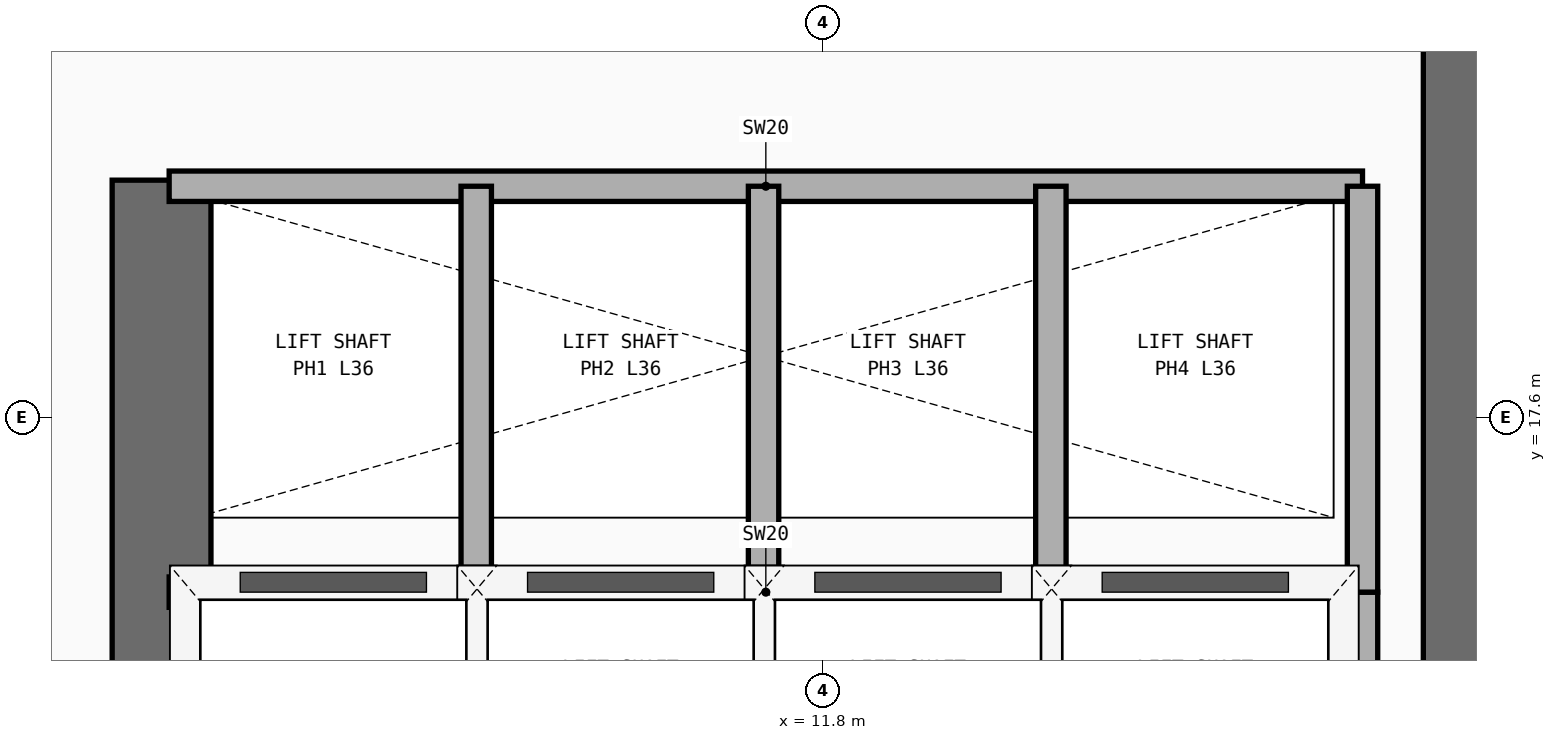
"""IFC4 building model, lengths in metres.
Left out: names, types, materials, properties, quantities, classifications, styles, units other than length and angle.
Written with IfcOpenShell. Run it as: python <this file> out.ifc"""

import sys

from ifc_helpers import new_model, si_unit, direction, frame, frame_2d, origin, place, context, subcontext, project, spatial, rectangle, extrude, element, save


model = new_model("IFC4")
c1 = context("Model", 3, precision=1e-05, world=origin(), true_north=direction((0.0, 1.0)))
c2 = subcontext(c1, "Body", "Model", "MODEL_VIEW")
j1 = project(units=[si_unit("LENGTHUNIT", "METRE"), si_unit("PLANEANGLEUNIT", "RADIAN")], contexts=[c1])
p1 = place(None, origin())
s1 = spatial("IfcSite", under=j1, at=p1, CompositionType="ELEMENT")
p2 = place(p1, origin())
s2 = spatial("IfcBuilding", under=s1, at=p2, CompositionType="ELEMENT")
p3 = place(p2, frame((0.0, 0.0, 141.1)))
s3 = spatial("IfcBuildingStorey", under=s2, at=p3, CompositionType="ELEMENT", Elevation=141.1)
p4 = place(p3, frame((7.45, 14.35, 0.0), z_axis=(0.0, 0.0, 1.0), x_axis=(0.0, 1.0, 0.0)))
e1 = element("IfcWall", 1, at=p4, inside=s3, PredefinedType="SHEAR", context=c2, shape_type="SweptSolid", body=[
    extrude(rectangle(XDim=4.81, YDim=0.65, at=frame_2d((2.405, 0.0))), origin(), (0.0, 0.0, 1.0), 4.86),
])
p5 = place(p3, frame((16.075, 14.4, 0.0), z_axis=(0.0, 0.0, 1.0), x_axis=(0.0, 1.0, 0.0)))
e2 = element("IfcWall", 2, at=p5, inside=s3, PredefinedType="SHEAR", context=c2, shape_type="SweptSolid", body=[
    extrude(rectangle(XDim=9.1, YDim=0.65, at=frame_2d((4.55, 0.0))), origin(), (0.0, 0.0, 1.0), 4.86),
])
p6 = place(p3, frame((7.5, 16.45, 0.0), z_axis=(0.0, 0.0, 1.0), x_axis=(1.0, 0.0, 0.0)))
e3 = element("IfcWall", 3, at=p6, inside=s3, PredefinedType="PARTITIONING", context=c2, shape_type="SweptSolid", body=[
    extrude(rectangle(XDim=7.85, YDim=0.2, at=frame_2d((3.925, 0.0))), origin(), (0.0, 0.0, 1.0), 4.86),
])
for number, where, z_axis, x_axis in (
    (4, (15.35, 14.22, 0.0), (0.0, 0.0, 1.0), (0.0, 1.0, 0.0)),
    (5, (9.52, 14.22, 0.0), (0.0, 0.0, 1.0), (0.0, 1.0, 0.0)),
    (6, (11.41, 14.22, 0.0), (0.0, 0.0, 1.0), (0.0, 1.0, 0.0)),
    (7, (13.3, 14.22, 0.0), (0.0, 0.0, 1.0), (0.0, 1.0, 0.0)),
):
    element("IfcWall", number, at=place(p3, frame(where, z_axis=z_axis, x_axis=x_axis)), inside=s3, PredefinedType="PARTITIONING", context=c2, shape_type="SweptSolid", body=[
        extrude(rectangle(XDim=2.23, YDim=0.2, at=frame_2d((1.115, 0.0))), origin(), (0.0, 0.0, 1.0), 4.86),
    ])
p7 = place(p3, frame((7.5, 19.12, 0.0), z_axis=(0.0, 0.0, 1.0), x_axis=(1.0, 0.0, 0.0)))
e8 = element("IfcWall", 8, at=p7, inside=s3, PredefinedType="PARTITIONING", context=c2, shape_type="SweptSolid", body=[
    extrude(rectangle(XDim=7.85, YDim=0.2, at=frame_2d((3.925, 0.0))), origin(), (0.0, 0.0, 1.0), 4.86),
])
for number, where, z_axis, x_axis in (
    (9, (15.35, 16.45, 0.0), (0.0, 0.0, 1.0), (0.0, 1.0, 0.0)),
    (10, (9.52, 16.45, 0.0), (0.0, 0.0, 1.0), (0.0, 1.0, 0.0)),
    (11, (11.41, 16.45, 0.0), (0.0, 0.0, 1.0), (0.0, 1.0, 0.0)),
    (12, (13.3, 16.45, 0.0), (0.0, 0.0, 1.0), (0.0, 1.0, 0.0)),
):
    element("IfcWall", number, at=place(p3, frame(where, z_axis=z_axis, x_axis=x_axis)), inside=s3, PredefinedType="PARTITIONING", context=c2, shape_type="SweptSolid", body=[
        extrude(rectangle(XDim=2.67, YDim=0.2, at=frame_2d((1.335, 0.0))), origin(), (0.0, 0.0, 1.0), 4.86),
    ])
save(model, sys.argv[1])
